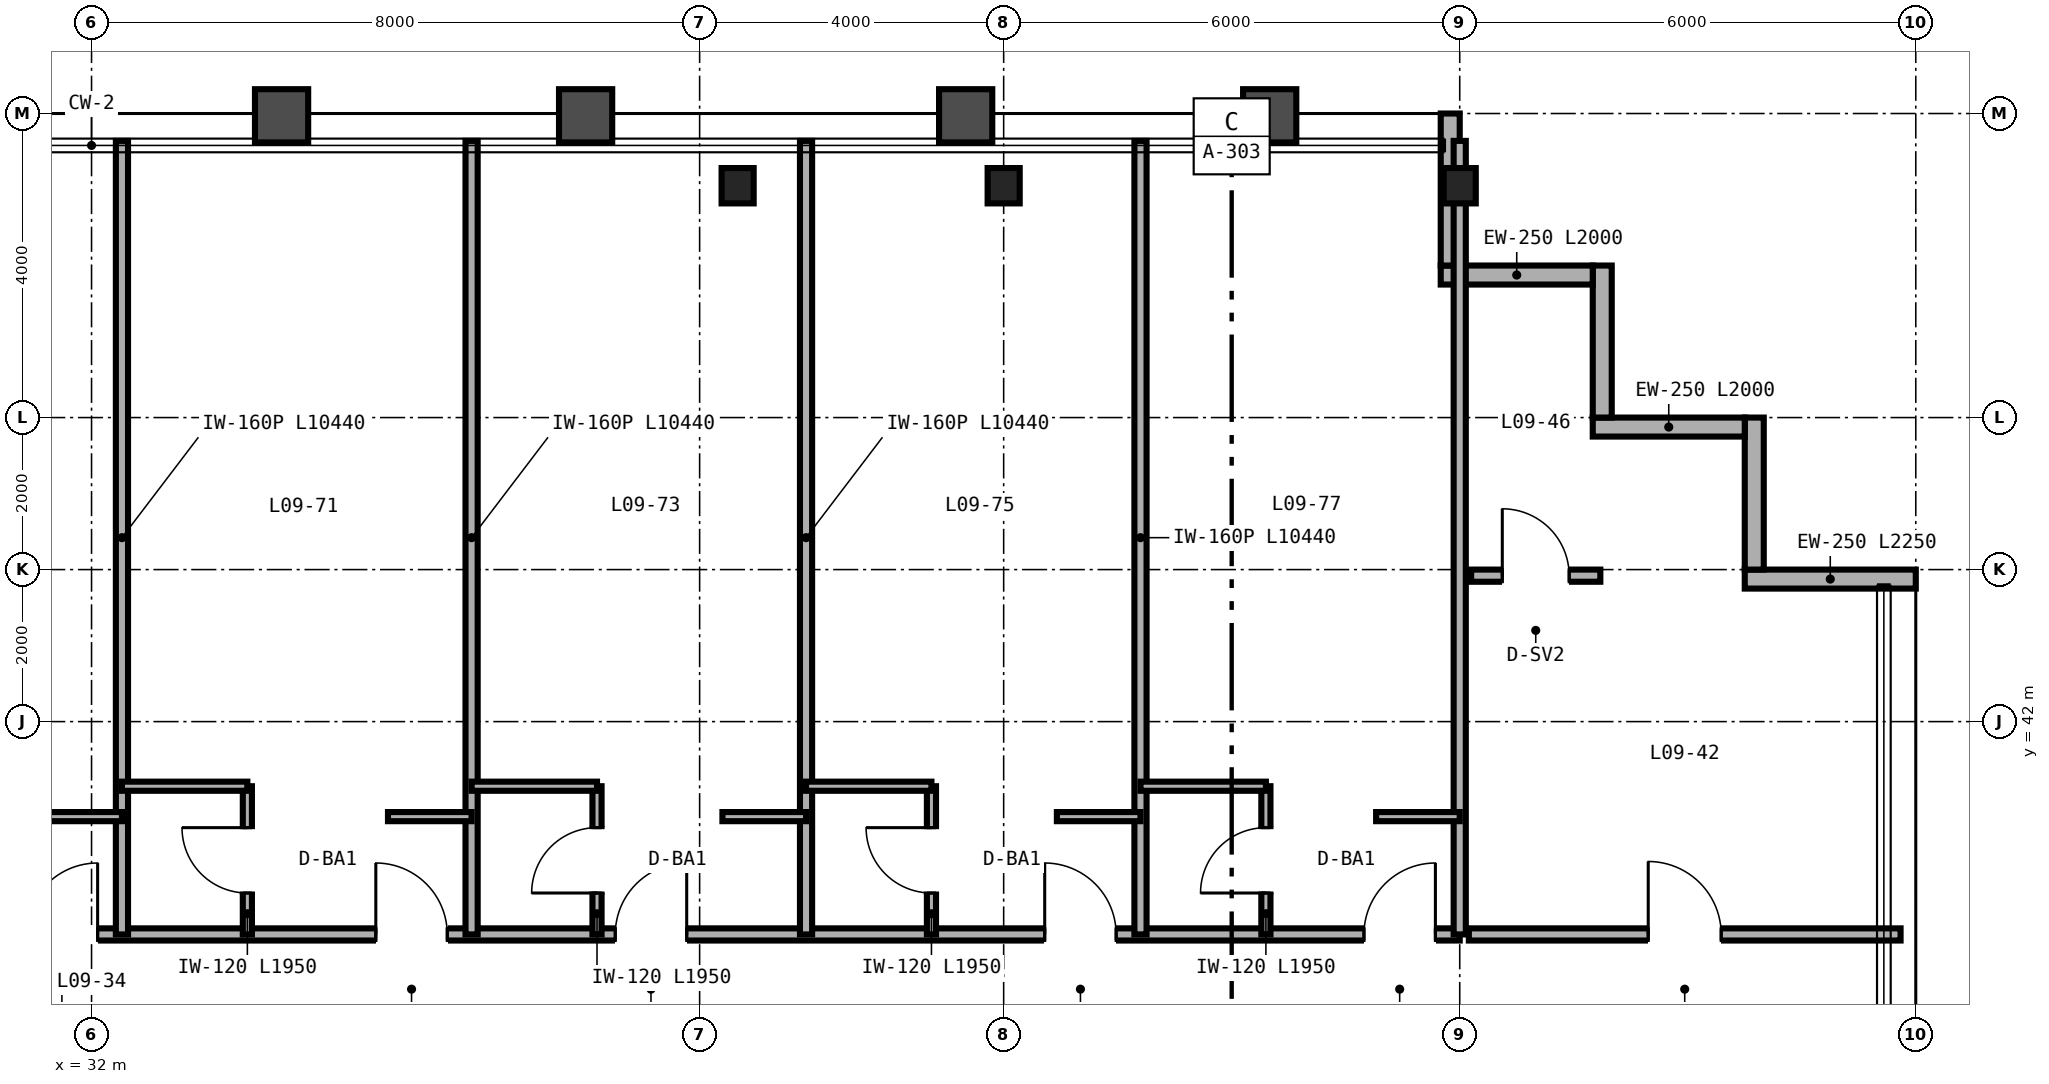
"""IFC4 building model, lengths in metres.
Left out: names, types, materials, properties, quantities, classifications, styles, units other than length and angle.
Written with IfcOpenShell. Run it as: python <this file> out.ifc"""

import sys

from ifc_helpers import new_model, si_unit, direction, frame, frame_2d, origin, origin_2d, place, context, subcontext, project, spatial, rectangle, i_section, extrude, source, transform, mapped, element, fill, save


model = new_model("IFC4")
c1 = context("Model", 3, precision=1e-05, world=origin(), true_north=direction((0.0, 1.0)))
c2 = subcontext(c1, "Body", "Model", "MODEL_VIEW")
j1 = project(units=[si_unit("LENGTHUNIT", "METRE"), si_unit("PLANEANGLEUNIT", "RADIAN")], contexts=[c1])
p1 = place(None, origin())
s1 = spatial("IfcSite", under=j1, at=p1, CompositionType="ELEMENT")
p2 = place(p1, origin())
s2 = spatial("IfcBuilding", under=s1, at=p2, CompositionType="ELEMENT")
p3 = place(p2, frame((0.0, 0.0, 42.0)))
s3 = spatial("IfcBuildingStorey", under=s2, at=p3, CompositionType="ELEMENT", Elevation=42.0)
m1 = source(origin(), c2, "Body", "SweptSolid", [
    extrude(i_section(OverallWidth=0.422, OverallDepth=0.465, WebThickness=0.045, FlangeThickness=0.073, FilletRadius=0.025, at=origin_2d()), origin(), (0.0, 0.0, 1.0), 3.35),
])
for number, where, z_axis, x_axis in (
    (1, (40.5, 49.05, 0.0), (0.0, 0.0, 1.0), (1.0, 0.0, 0.0)),
    (2, (44.0, 49.05, 0.0), (0.0, 0.0, 1.0), (1.0, 0.0, 0.0)),
    (3, (50.0, 49.05, 0.0), (0.0, 0.0, 1.0), (1.0, 0.0, 0.0)),
):
    element("IfcColumn", number, at=place(p3, frame(where, z_axis=z_axis, x_axis=x_axis)), inside=s3, PredefinedType="COLUMN", context=c2, shape_type="MappedRepresentation", body=[
        mapped(m1, transform((0.0, 0.0, 0.0), scale=1.0)),
    ])
p4 = place(p3, frame((56.0, 43.875, 0.0), z_axis=(0.0, 0.0, 1.0), x_axis=(-1.0, 0.0, 0.0)))
e4 = element("IfcWall", 4, at=p4, inside=s3, PredefinedType="SOLIDWALL", context=c2, shape_type="SweptSolid", body=[
    extrude(rectangle(XDim=2.25, YDim=0.25, at=frame_2d((1.125, 0.0))), origin(), (0.0, 0.0, 1.0), 3.35),
])
for number, where, z_axis, x_axis in (
    (5, (53.875, 44.0, 0.0), (0.0, 0.0, 1.0), (0.0, 1.0, 0.0)),
    (6, (53.75, 45.875, 0.0), (0.0, 0.0, 1.0), (-1.0, 0.0, 0.0)),
    (7, (51.875, 46.0, 0.0), (0.0, 0.0, 1.0), (0.0, 1.0, 0.0)),
    (8, (51.75, 47.875, 0.0), (0.0, 0.0, 1.0), (-1.0, 0.0, 0.0)),
):
    element("IfcWall", number, at=place(p3, frame(where, z_axis=z_axis, x_axis=x_axis)), inside=s3, PredefinedType="SOLIDWALL", context=c2, shape_type="SweptSolid", body=[
        extrude(rectangle(XDim=2.0, YDim=0.25, at=frame_2d((1.0, 0.0))), origin(), (0.0, 0.0, 1.0), 3.35),
    ])
p5 = place(p3, frame((49.875, 48.0, 0.0), z_axis=(0.0, 0.0, 1.0), x_axis=(0.0, 1.0, 0.0)))
e9 = element("IfcWall", 9, at=p5, inside=s3, PredefinedType="SOLIDWALL", context=c2, shape_type="SweptSolid", body=[
    extrude(rectangle(XDim=2.0, YDim=0.25, at=frame_2d((1.0, 0.0))), origin(), (0.0, 0.0, 1.0), 2.657),
])
p6 = place(p3, frame((50.12, 39.2, 0.0), z_axis=(0.0, 0.0, 1.0), x_axis=(1.0, 0.0, 0.0)))
e10 = element("IfcWall", 10, at=p6, inside=s3, PredefinedType="PARTITIONING", context=c2, shape_type="SweptSolid", body=[
    extrude(rectangle(XDim=5.68, YDim=0.16, at=frame_2d((2.84, 0.0))), origin(), (0.0, 0.0, 1.0), 3.35),
])
p7 = place(p6, frame((2.36, 0.0, 0.0)))
e11 = element("IfcOpeningElement", 11, at=p7, cuts=e10, PredefinedType="OPENING", context=c2, shape_type="SweptSolid", body=[
    extrude(rectangle(XDim=0.96, YDim=2.15, at=frame_2d((0.48, 1.075))), frame((0.0, 0.09, 0.0), z_axis=(0.0, -1.0, 0.0), x_axis=(1.0, 0.0, 0.0)), (0.0, 0.0, 1.0), 0.18),
])
p8 = place(p3, frame((50.15, 43.92, 0.0), z_axis=(0.0, 0.0, 1.0), x_axis=(1.0, 0.0, 0.0)))
e12 = element("IfcWall", 12, at=p8, inside=s3, PredefinedType="PARTITIONING", context=c2, shape_type="SweptSolid", body=[
    extrude(rectangle(XDim=1.7, YDim=0.16, at=frame_2d((0.85, 0.0))), origin(), (0.0, 0.0, 1.0), 3.35),
])
p9 = place(p8, frame((0.41, 0.0, 0.0)))
e13 = element("IfcOpeningElement", 13, at=p9, cuts=e12, PredefinedType="OPENING", context=c2, shape_type="SweptSolid", body=[
    extrude(rectangle(XDim=0.88, YDim=2.15, at=frame_2d((0.44, 1.075))), frame((0.0, 0.09, 0.0), z_axis=(0.0, -1.0, 0.0), x_axis=(1.0, 0.0, 0.0)), (0.0, 0.0, 1.0), 0.18),
])
p10 = place(p3, frame((14.0, 39.2, 0.0), z_axis=(0.0, 0.0, 1.0), x_axis=(1.0, 0.0, 0.0)))
e14 = element("IfcWall", 14, at=p10, inside=s3, PredefinedType="PARTITIONING", context=c2, shape_type="SweptSolid", body=[
    extrude(rectangle(XDim=36.0, YDim=0.16, at=frame_2d((18.0, 0.0))), origin(), (0.0, 0.0, 1.0), 2.571),
])
p11 = place(p10, frame((3.34, 0.0, 0.0)))
e15 = element("IfcOpeningElement", 15, at=p11, cuts=e14, PredefinedType="OPENING", context=c2, shape_type="SweptSolid", body=[
    extrude(rectangle(XDim=0.94, YDim=2.15, at=frame_2d((0.47, 1.075))), frame((0.0, 0.09, 0.0), z_axis=(0.0, -1.0, 0.0), x_axis=(1.0, 0.0, 0.0)), (0.0, 0.0, 1.0), 0.18),
])
p12 = place(p10, frame((7.79, 0.0, 0.0)))
e16 = element("IfcOpeningElement", 16, at=p12, cuts=e14, PredefinedType="OPENING", context=c2, shape_type="SweptSolid", body=[
    extrude(rectangle(XDim=0.94, YDim=2.15, at=frame_2d((0.47, 1.075))), frame((0.0, 0.09, 0.0), z_axis=(0.0, -1.0, 0.0), x_axis=(1.0, 0.0, 0.0)), (0.0, 0.0, 1.0), 0.18),
])
p13 = place(p10, frame((12.54, 0.0, 0.0)))
e17 = element("IfcOpeningElement", 17, at=p13, cuts=e14, PredefinedType="OPENING", context=c2, shape_type="SweptSolid", body=[
    extrude(rectangle(XDim=0.94, YDim=2.15, at=frame_2d((0.47, 1.075))), frame((0.0, 0.09, 0.0), z_axis=(0.0, -1.0, 0.0), x_axis=(1.0, 0.0, 0.0)), (0.0, 0.0, 1.0), 0.18),
])
p14 = place(p10, frame((17.14, 0.0, 0.0)))
e18 = element("IfcOpeningElement", 18, at=p14, cuts=e14, PredefinedType="OPENING", context=c2, shape_type="SweptSolid", body=[
    extrude(rectangle(XDim=0.94, YDim=2.15, at=frame_2d((0.47, 1.075))), frame((0.0, 0.09, 0.0), z_axis=(0.0, -1.0, 0.0), x_axis=(1.0, 0.0, 0.0)), (0.0, 0.0, 1.0), 0.18),
])
p15 = place(p10, frame((21.74, 0.0, 0.0)))
e19 = element("IfcOpeningElement", 19, at=p15, cuts=e14, PredefinedType="OPENING", context=c2, shape_type="SweptSolid", body=[
    extrude(rectangle(XDim=0.94, YDim=2.15, at=frame_2d((0.47, 1.075))), frame((0.0, 0.09, 0.0), z_axis=(0.0, -1.0, 0.0), x_axis=(1.0, 0.0, 0.0)), (0.0, 0.0, 1.0), 0.18),
])
p16 = place(p10, frame((24.89, 0.0, 0.0)))
e20 = element("IfcOpeningElement", 20, at=p16, cuts=e14, PredefinedType="OPENING", context=c2, shape_type="SweptSolid", body=[
    extrude(rectangle(XDim=0.94, YDim=2.15, at=frame_2d((0.47, 1.075))), frame((0.0, 0.09, 0.0), z_axis=(0.0, -1.0, 0.0), x_axis=(1.0, 0.0, 0.0)), (0.0, 0.0, 1.0), 0.18),
])
p17 = place(p10, frame((30.54, 0.0, 0.0)))
e21 = element("IfcOpeningElement", 21, at=p17, cuts=e14, PredefinedType="OPENING", context=c2, shape_type="SweptSolid", body=[
    extrude(rectangle(XDim=0.94, YDim=2.15, at=frame_2d((0.47, 1.075))), frame((0.0, 0.09, 0.0), z_axis=(0.0, -1.0, 0.0), x_axis=(1.0, 0.0, 0.0)), (0.0, 0.0, 1.0), 0.18),
])
p18 = place(p10, frame((34.74, 0.0, 0.0)))
e22 = element("IfcOpeningElement", 22, at=p18, cuts=e14, PredefinedType="OPENING", context=c2, shape_type="SweptSolid", body=[
    extrude(rectangle(XDim=0.94, YDim=2.15, at=frame_2d((0.47, 1.075))), frame((0.0, 0.09, 0.0), z_axis=(0.0, -1.0, 0.0), x_axis=(1.0, 0.0, 0.0)), (0.0, 0.0, 1.0), 0.18),
])
p19 = place(p3, frame((50.0, 39.2, 0.0), z_axis=(0.0, 0.0, 1.0), x_axis=(0.0, 1.0, 0.0)))
e23 = element("IfcWall", 23, at=p19, inside=s3, PredefinedType="PARTITIONING", context=c2, shape_type="SweptSolid", body=[
    extrude(rectangle(XDim=10.44, YDim=0.16, at=frame_2d((5.22, 0.0))), origin(), (0.0, 0.0, 1.0), 2.657),
])
p20 = place(p3, frame((32.4, 39.2, 0.0), z_axis=(0.0, 0.0, 1.0), x_axis=(0.0, 1.0, 0.0)))
e24 = element("IfcWall", 24, at=p20, inside=s3, PredefinedType="PARTITIONING", context=c2, shape_type="SweptSolid", body=[
    extrude(rectangle(XDim=10.44, YDim=0.16, at=frame_2d((5.22, 0.0))), origin(), (0.0, 0.0, 1.0), 2.423),
])
p21 = place(p3, frame((31.3, 40.75, 0.0), z_axis=(0.0, 0.0, 1.0), x_axis=(1.0, 0.0, 0.0)))
e25 = element("IfcWall", 25, at=p21, inside=s3, PredefinedType="PARTITIONING", context=c2, shape_type="SweptSolid", body=[
    extrude(rectangle(XDim=1.1, YDim=0.12, at=frame_2d((0.55, 0.0))), origin(), (0.0, 0.0, 1.0), 3.35),
])
p22 = place(p3, frame((37.0, 39.2, 0.0), z_axis=(0.0, 0.0, 1.0), x_axis=(0.0, 1.0, 0.0)))
e26 = element("IfcWall", 26, at=p22, inside=s3, PredefinedType="PARTITIONING", context=c2, shape_type="SweptSolid", body=[
    extrude(rectangle(XDim=10.44, YDim=0.16, at=frame_2d((5.22, 0.0))), origin(), (0.0, 0.0, 1.0), 2.423),
])
p23 = place(p3, frame((34.05, 39.2, 0.0), z_axis=(0.0, 0.0, 1.0), x_axis=(0.0, 1.0, 0.0)))
e27 = element("IfcWall", 27, at=p23, inside=s3, PredefinedType="PARTITIONING", context=c2, shape_type="SweptSolid", body=[
    extrude(rectangle(XDim=1.95, YDim=0.12, at=frame_2d((0.975, 0.0))), origin(), (0.0, 0.0, 1.0), 3.35),
])
p24 = place(p23, frame((0.545, 0.0, 0.0)))
e28 = element("IfcOpeningElement", 28, at=p24, cuts=e27, PredefinedType="OPENING", context=c2, shape_type="SweptSolid", body=[
    extrude(rectangle(XDim=0.86, YDim=2.1, at=frame_2d((0.43, 1.05))), frame((0.0, 0.07, 0.0), z_axis=(0.0, -1.0, 0.0), x_axis=(1.0, 0.0, 0.0)), (0.0, 0.0, 1.0), 0.14),
])
p25 = place(p3, frame((32.4, 41.15, 0.0), z_axis=(0.0, 0.0, 1.0), x_axis=(1.0, 0.0, 0.0)))
e29 = element("IfcWall", 29, at=p25, inside=s3, PredefinedType="PARTITIONING", context=c2, shape_type="SweptSolid", body=[
    extrude(rectangle(XDim=1.65, YDim=0.12, at=frame_2d((0.825, 0.0))), origin(), (0.0, 0.0, 1.0), 3.35),
])
p26 = place(p3, frame((35.9, 40.75, 0.0), z_axis=(0.0, 0.0, 1.0), x_axis=(1.0, 0.0, 0.0)))
e30 = element("IfcWall", 30, at=p26, inside=s3, PredefinedType="PARTITIONING", context=c2, shape_type="SweptSolid", body=[
    extrude(rectangle(XDim=1.1, YDim=0.12, at=frame_2d((0.55, 0.0))), origin(), (0.0, 0.0, 1.0), 3.35),
])
p27 = place(p3, frame((41.4, 39.2, 0.0), z_axis=(0.0, 0.0, 1.0), x_axis=(0.0, 1.0, 0.0)))
e31 = element("IfcWall", 31, at=p27, inside=s3, PredefinedType="PARTITIONING", context=c2, shape_type="SweptSolid", body=[
    extrude(rectangle(XDim=10.44, YDim=0.16, at=frame_2d((5.22, 0.0))), origin(), (0.0, 0.0, 1.0), 2.813),
])
p28 = place(p3, frame((38.65, 39.2, 0.0), z_axis=(0.0, 0.0, 1.0), x_axis=(0.0, 1.0, 0.0)))
e32 = element("IfcWall", 32, at=p28, inside=s3, PredefinedType="PARTITIONING", context=c2, shape_type="SweptSolid", body=[
    extrude(rectangle(XDim=1.95, YDim=0.12, at=frame_2d((0.975, 0.0))), origin(), (0.0, 0.0, 1.0), 3.35),
])
p29 = place(p28, frame((0.545, 0.0, 0.0)))
e33 = element("IfcOpeningElement", 33, at=p29, cuts=e32, PredefinedType="OPENING", context=c2, shape_type="SweptSolid", body=[
    extrude(rectangle(XDim=0.86, YDim=2.1, at=frame_2d((0.43, 1.05))), frame((0.0, 0.07, 0.0), z_axis=(0.0, -1.0, 0.0), x_axis=(1.0, 0.0, 0.0)), (0.0, 0.0, 1.0), 0.14),
])
p30 = place(p3, frame((37.0, 41.15, 0.0), z_axis=(0.0, 0.0, 1.0), x_axis=(1.0, 0.0, 0.0)))
e34 = element("IfcWall", 34, at=p30, inside=s3, PredefinedType="PARTITIONING", context=c2, shape_type="SweptSolid", body=[
    extrude(rectangle(XDim=1.65, YDim=0.12, at=frame_2d((0.825, 0.0))), origin(), (0.0, 0.0, 1.0), 3.35),
])
p31 = place(p3, frame((40.3, 40.75, 0.0), z_axis=(0.0, 0.0, 1.0), x_axis=(1.0, 0.0, 0.0)))
e35 = element("IfcWall", 35, at=p31, inside=s3, PredefinedType="PARTITIONING", context=c2, shape_type="SweptSolid", body=[
    extrude(rectangle(XDim=1.1, YDim=0.12, at=frame_2d((0.55, 0.0))), origin(), (0.0, 0.0, 1.0), 2.571),
])
p32 = place(p3, frame((45.8, 39.2, 0.0), z_axis=(0.0, 0.0, 1.0), x_axis=(0.0, 1.0, 0.0)))
e36 = element("IfcWall", 36, at=p32, inside=s3, PredefinedType="PARTITIONING", context=c2, shape_type="SweptSolid", body=[
    extrude(rectangle(XDim=10.44, YDim=0.16, at=frame_2d((5.22, 0.0))), origin(), (0.0, 0.0, 1.0), 2.657),
])
p33 = place(p3, frame((43.05, 39.2, 0.0), z_axis=(0.0, 0.0, 1.0), x_axis=(0.0, 1.0, 0.0)))
e37 = element("IfcWall", 37, at=p33, inside=s3, PredefinedType="PARTITIONING", context=c2, shape_type="SweptSolid", body=[
    extrude(rectangle(XDim=1.95, YDim=0.12, at=frame_2d((0.975, 0.0))), origin(), (0.0, 0.0, 1.0), 3.35),
])
p34 = place(p33, frame((0.545, 0.0, 0.0)))
e38 = element("IfcOpeningElement", 38, at=p34, cuts=e37, PredefinedType="OPENING", context=c2, shape_type="SweptSolid", body=[
    extrude(rectangle(XDim=0.86, YDim=2.1, at=frame_2d((0.43, 1.05))), frame((0.0, 0.07, 0.0), z_axis=(0.0, -1.0, 0.0), x_axis=(1.0, 0.0, 0.0)), (0.0, 0.0, 1.0), 0.14),
])
p35 = place(p3, frame((41.4, 41.15, 0.0), z_axis=(0.0, 0.0, 1.0), x_axis=(1.0, 0.0, 0.0)))
e39 = element("IfcWall", 39, at=p35, inside=s3, PredefinedType="PARTITIONING", context=c2, shape_type="SweptSolid", body=[
    extrude(rectangle(XDim=1.65, YDim=0.12, at=frame_2d((0.825, 0.0))), origin(), (0.0, 0.0, 1.0), 3.35),
])
p36 = place(p3, frame((44.7, 40.75, 0.0), z_axis=(0.0, 0.0, 1.0), x_axis=(1.0, 0.0, 0.0)))
e40 = element("IfcWall", 40, at=p36, inside=s3, PredefinedType="PARTITIONING", context=c2, shape_type="SweptSolid", body=[
    extrude(rectangle(XDim=1.1, YDim=0.12, at=frame_2d((0.55, 0.0))), origin(), (0.0, 0.0, 1.0), 3.35),
])
p37 = place(p3, frame((47.45, 39.2, 0.0), z_axis=(0.0, 0.0, 1.0), x_axis=(0.0, 1.0, 0.0)))
e41 = element("IfcWall", 41, at=p37, inside=s3, PredefinedType="PARTITIONING", context=c2, shape_type="SweptSolid", body=[
    extrude(rectangle(XDim=1.95, YDim=0.12, at=frame_2d((0.975, 0.0))), origin(), (0.0, 0.0, 1.0), 3.35),
])
p38 = place(p37, frame((0.545, 0.0, 0.0)))
e42 = element("IfcOpeningElement", 42, at=p38, cuts=e41, PredefinedType="OPENING", context=c2, shape_type="SweptSolid", body=[
    extrude(rectangle(XDim=0.86, YDim=2.1, at=frame_2d((0.43, 1.05))), frame((0.0, 0.07, 0.0), z_axis=(0.0, -1.0, 0.0), x_axis=(1.0, 0.0, 0.0)), (0.0, 0.0, 1.0), 0.14),
])
p39 = place(p3, frame((45.8, 41.15, 0.0), z_axis=(0.0, 0.0, 1.0), x_axis=(1.0, 0.0, 0.0)))
e43 = element("IfcWall", 43, at=p39, inside=s3, PredefinedType="PARTITIONING", context=c2, shape_type="SweptSolid", body=[
    extrude(rectangle(XDim=1.65, YDim=0.12, at=frame_2d((0.825, 0.0))), origin(), (0.0, 0.0, 1.0), 3.35),
])
p40 = place(p3, frame((48.9, 40.75, 0.0), z_axis=(0.0, 0.0, 1.0), x_axis=(1.0, 0.0, 0.0)))
e44 = element("IfcWall", 44, at=p40, inside=s3, PredefinedType="PARTITIONING", context=c2, shape_type="SweptSolid", body=[
    extrude(rectangle(XDim=1.1, YDim=0.12, at=frame_2d((0.55, 0.0))), origin(), (0.0, 0.0, 1.0), 3.35),
])
m2 = source(origin(), c2, "Body", "SweptSolid", [
    extrude(rectangle(XDim=0.96, YDim=2.15, at=frame_2d((0.48, 1.075))), frame((0.0, 0.025, 0.0), z_axis=(0.0, -1.0, 0.0), x_axis=(1.0, 0.0, 0.0)), (0.0, 0.0, 1.0), 0.05),
])
p41 = place(p7, origin())
e45 = element("IfcDoor", 45, at=p41, inside=s3, OperationType="SINGLE_SWING_LEFT", PredefinedType="DOOR", context=c2, shape_type="MappedRepresentation", body=[
    mapped(m2, transform((0.0, 0.0, 0.0), scale=1.0)),
])
fill(e11, e45)
m3 = source(origin(), c2, "Body", "SweptSolid", [
    extrude(rectangle(XDim=0.88, YDim=2.15, at=frame_2d((0.44, 1.075))), frame((0.0, 0.025, 0.0), z_axis=(0.0, -1.0, 0.0), x_axis=(1.0, 0.0, 0.0)), (0.0, 0.0, 1.0), 0.05),
])
p42 = place(p9, origin())
e46 = element("IfcDoor", 46, at=p42, inside=s3, OperationType="SINGLE_SWING_LEFT", PredefinedType="DOOR", context=c2, shape_type="MappedRepresentation", body=[
    mapped(m3, transform((0.0, 0.0, 0.0), scale=1.0)),
])
fill(e13, e46)
m4 = source(origin(), c2, "Body", "SweptSolid", [
    extrude(rectangle(XDim=0.86, YDim=2.1, at=frame_2d((0.43, 1.05))), frame((0.0, 0.025, 0.0), z_axis=(0.0, -1.0, 0.0), x_axis=(1.0, 0.0, 0.0)), (0.0, 0.0, 1.0), 0.05),
])
p43 = place(p24, origin())
e47 = element("IfcDoor", 47, at=p43, inside=s3, OperationType="SINGLE_SWING_RIGHT", PredefinedType="DOOR", context=c2, shape_type="MappedRepresentation", body=[
    mapped(m4, transform((0.0, 0.0, 0.0), scale=1.0)),
])
fill(e28, e47)
p44 = place(p29, origin())
e48 = element("IfcDoor", 48, at=p44, inside=s3, OperationType="SINGLE_SWING_LEFT", PredefinedType="DOOR", context=c2, shape_type="MappedRepresentation", body=[
    mapped(m4, transform((0.0, 0.0, 0.0), scale=1.0)),
])
fill(e33, e48)
p45 = place(p34, origin())
e49 = element("IfcDoor", 49, at=p45, inside=s3, OperationType="SINGLE_SWING_RIGHT", PredefinedType="DOOR", context=c2, shape_type="MappedRepresentation", body=[
    mapped(m4, transform((0.0, 0.0, 0.0), scale=1.0)),
])
fill(e38, e49)
p46 = place(p38, origin())
e50 = element("IfcDoor", 50, at=p46, inside=s3, OperationType="SINGLE_SWING_LEFT", PredefinedType="DOOR", context=c2, shape_type="MappedRepresentation", body=[
    mapped(m4, transform((0.0, 0.0, 0.0), scale=1.0)),
])
fill(e42, e50)
m5 = source(origin(), c2, "Body", "SweptSolid", [
    extrude(rectangle(XDim=0.94, YDim=2.15, at=frame_2d((0.47, 1.075))), frame((0.0, 0.025, 0.0), z_axis=(0.0, -1.0, 0.0), x_axis=(1.0, 0.0, 0.0)), (0.0, 0.0, 1.0), 0.05),
])
p47 = place(p14, origin())
e51 = element("IfcDoor", 51, at=p47, inside=s3, OperationType="SINGLE_SWING_RIGHT", PredefinedType="DOOR", context=c2, shape_type="MappedRepresentation", body=[
    mapped(m5, transform((0.0, 0.0, 0.0), scale=1.0)),
])
fill(e18, e51)
p48 = place(p15, origin())
e52 = element("IfcDoor", 52, at=p48, inside=s3, OperationType="SINGLE_SWING_LEFT", PredefinedType="DOOR", context=c2, shape_type="MappedRepresentation", body=[
    mapped(m5, transform((0.0, 0.0, 0.0), scale=1.0)),
])
fill(e19, e52)
p49 = place(p16, origin())
e53 = element("IfcDoor", 53, at=p49, inside=s3, OperationType="SINGLE_SWING_RIGHT", PredefinedType="DOOR", context=c2, shape_type="MappedRepresentation", body=[
    mapped(m5, transform((0.0, 0.0, 0.0), scale=1.0)),
])
fill(e20, e53)
p50 = place(p17, origin())
e54 = element("IfcDoor", 54, at=p50, inside=s3, OperationType="SINGLE_SWING_LEFT", PredefinedType="DOOR", context=c2, shape_type="MappedRepresentation", body=[
    mapped(m5, transform((0.0, 0.0, 0.0), scale=1.0)),
])
fill(e21, e54)
p51 = place(p18, origin())
e55 = element("IfcDoor", 55, at=p51, inside=s3, OperationType="SINGLE_SWING_RIGHT", PredefinedType="DOOR", context=c2, shape_type="MappedRepresentation", body=[
    mapped(m5, transform((0.0, 0.0, 0.0), scale=1.0)),
])
fill(e22, e55)
save(model, sys.argv[1])
